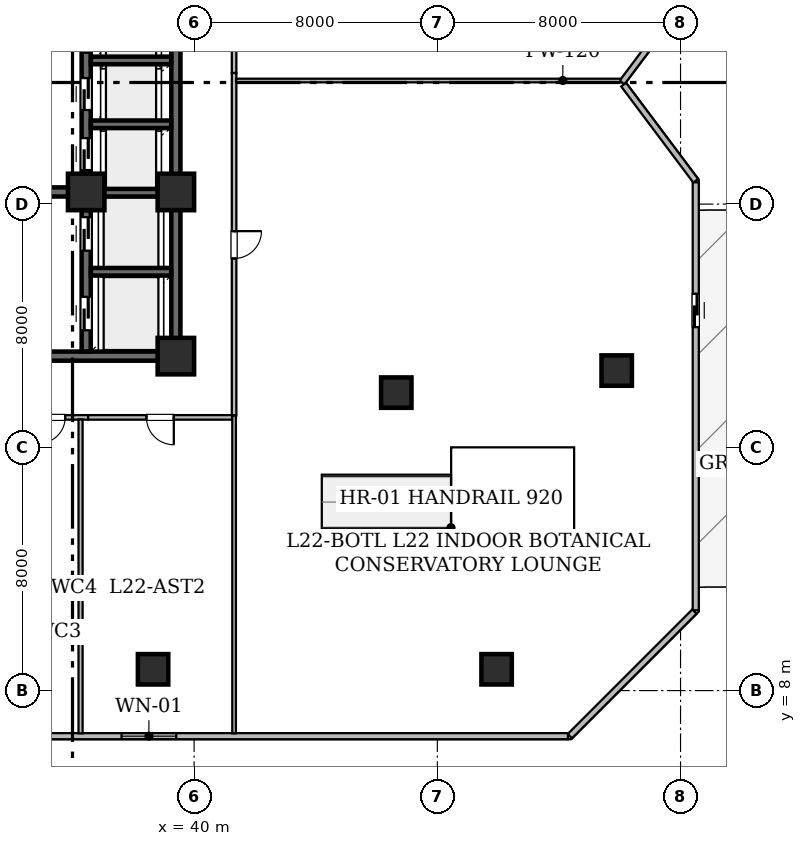
"""IFC4 building model, lengths in metres.
Left out: names, types, materials, properties, quantities, classifications, styles, units other than length and angle.
Written with IfcOpenShell. Run it as: python <this file> out.ifc"""

import sys

from ifc_helpers import new_model, si_unit, direction, frame, frame_2d, origin, origin_2d, place, context, subcontext, project, spatial, rectangle, hollow_rectangle, extrude, element, fill, save


model = new_model("IFC4")
c1 = context("Model", 3, precision=1e-05, world=origin(), true_north=direction((0.0, 1.0)))
c2 = subcontext(c1, "Body", "Model", "MODEL_VIEW")
j1 = project(units=[si_unit("LENGTHUNIT", "METRE"), si_unit("PLANEANGLEUNIT", "RADIAN")], contexts=[c1])
p1 = place(None, origin())
s1 = spatial("IfcSite", under=j1, at=p1, CompositionType="ELEMENT")
p2 = place(p1, origin())
s2 = spatial("IfcBuilding", under=s1, at=p2, CompositionType="ELEMENT")
p3 = place(p2, frame((0.0, 0.0, 89.8)))
s3 = spatial("IfcBuildingStorey", under=s2, at=p3, CompositionType="ELEMENT", Elevation=89.8)
for number, where, z_axis, x_axis in (
    (1, (39.4, 19.0, 0.0), (0.0, 0.0, 1.0), (1.0, 0.0, 0.0)),
    (2, (36.45, 24.4, 0.0), (0.0, 0.0, 1.0), (1.0, 0.0, 0.0)),
    (3, (39.4, 24.4, 0.0), (0.0, 0.0, 1.0), (1.0, 0.0, 0.0)),
):
    element("IfcColumn", number, at=place(p3, frame(where, z_axis=z_axis, x_axis=x_axis)), inside=s3, PredefinedType="COLUMN", context=c2, shape_type="SweptSolid", body=[
        extrude(hollow_rectangle(XDim=1.2, YDim=1.2, WallThickness=0.06, at=origin_2d()), origin(), (0.0, 0.0, 1.0), 4.8),
    ])
for number, where, z_axis, x_axis in (
    (4, (38.65, 8.7, 0.025), (0.0, 0.0, 1.0), (1.0, 0.0, 0.0)),
    (5, (49.95, 8.7, 0.025), (0.0, 0.0, 1.0), (1.0, 0.0, 0.0)),
    (6, (53.9, 18.525, 0.025), (0.0, 0.0, 1.0), (1.0, 0.0, 0.0)),
    (7, (46.65, 17.8, 0.025), (0.0, 0.0, 1.0), (1.0, 0.0, 0.0)),
):
    element("IfcColumn", number, at=place(p3, frame(where, z_axis=z_axis, x_axis=x_axis)), inside=s3, PredefinedType="COLUMN", context=c2, shape_type="SweptSolid", body=[
        extrude(hollow_rectangle(XDim=1.0, YDim=1.0, WallThickness=0.05, at=origin_2d()), origin(), (0.0, 0.0, 1.0), 4.775),
    ])
p4 = place(p3, frame((56.469, 31.191, 0.0), z_axis=(0.0, 0.0, 1.0), x_axis=(-0.600137081448, -0.799897170561, 0.0)))
e8 = element("IfcWall", 8, at=p4, inside=s3, PredefinedType="STANDARD", context=c2, shape_type="SweptSolid", body=[
    extrude(rectangle(XDim=3.989, YDim=0.2, at=frame_2d((1.995, 0.0))), origin(), (0.0, 0.0, 1.0), 4.58),
])
p5 = place(p3, frame((54.127, 27.931, 0.0), z_axis=(0.0, 0.0, 1.0), x_axis=(0.600029630681, -0.799977776132, 0.0)))
e9 = element("IfcWall", 9, at=p5, inside=s3, PredefinedType="STANDARD", context=c2, shape_type="SweptSolid", body=[
    extrude(rectangle(XDim=3.955, YDim=0.2, at=frame_2d((1.978, 0.0))), origin(), (0.0, 0.0, 1.0), 4.58),
])
p6 = place(p3, frame((56.5, 24.717, 0.0), z_axis=(0.0, 0.0, 1.0), x_axis=(0.0, -1.0, 0.0)))
e10 = element("IfcWall", 10, at=p6, inside=s3, PredefinedType="STANDARD", context=c2, shape_type="SweptSolid", body=[
    extrude(rectangle(XDim=14.076, YDim=0.2, at=frame_2d((7.038, 0.0))), origin(), (0.0, 0.0, 1.0), 4.58),
])
p7 = place(p6, frame((3.664, 0.0, 0.0)))
e11 = element("IfcOpeningElement", 11, at=p7, cuts=e10, PredefinedType="OPENING", context=c2, shape_type="SweptSolid", body=[
    extrude(rectangle(XDim=1.1, YDim=2.2, at=frame_2d((0.55, 1.1))), frame((0.0, 0.11, 0.0), z_axis=(0.0, -1.0, 0.0), x_axis=(1.0, 0.0, 0.0)), (0.0, 0.0, 1.0), 0.22),
])
p8 = place(p3, frame((56.457, 10.598, 0.0), z_axis=(0.0, 0.0, 1.0), x_axis=(-0.707127843897, -0.707085717849, 0.0)))
e12 = element("IfcWall", 12, at=p8, inside=s3, PredefinedType="STANDARD", context=c2, shape_type="SweptSolid", body=[
    extrude(rectangle(XDim=5.795, YDim=0.2, at=frame_2d((2.898, 0.0))), origin(), (0.0, 0.0, 1.0), 4.58),
])
p9 = place(p3, frame((52.296, 6.5, 0.0), z_axis=(0.0, 0.0, 1.0), x_axis=(-1.0, 0.0, 0.0)))
e13 = element("IfcWall", 13, at=p9, inside=s3, PredefinedType="STANDARD", context=c2, shape_type="SweptSolid", body=[
    extrude(rectangle(XDim=38.593, YDim=0.2, at=frame_2d((19.296, 0.0))), origin(), (0.0, 0.0, 1.0), 4.58),
])
p10 = place(p9, frame((12.883, 0.0, 0.9)))
e14 = element("IfcOpeningElement", 14, at=p10, cuts=e13, PredefinedType="OPENING", context=c2, shape_type="SweptSolid", body=[
    extrude(rectangle(XDim=1.8, YDim=1.6, at=frame_2d((0.9, 0.8))), frame((0.0, 0.11, 0.0), z_axis=(0.0, -1.0, 0.0), x_axis=(1.0, 0.0, 0.0)), (0.0, 0.0, 1.0), 0.22),
])
p11 = place(p3, frame((29.0, 19.0, 0.0), z_axis=(0.0, 0.0, 1.0), x_axis=(1.0, 0.0, 0.0)))
e15 = element("IfcWall", 15, at=p11, inside=s3, PredefinedType="SHEAR", context=c2, shape_type="SweptSolid", body=[
    extrude(rectangle(XDim=10.4, YDim=0.3, at=frame_2d((5.2, 0.0))), origin(), (0.0, 0.0, 1.0), 4.58),
])
p12 = place(p11, frame((4.9, 0.0, 0.0)))
e16 = element("IfcOpeningElement", 16, at=p12, cuts=e15, PredefinedType="OPENING", context=c2, shape_type="SweptSolid", body=[
    extrude(rectangle(XDim=1.2, YDim=2.15, at=frame_2d((0.6, 1.075))), frame((0.0, 0.16, 0.0), z_axis=(0.0, -1.0, 0.0), x_axis=(1.0, 0.0, 0.0)), (0.0, 0.0, 1.0), 0.32),
])
p13 = place(p3, frame((39.4, 19.0, 0.0), z_axis=(0.0, 0.0, 1.0), x_axis=(0.0, 1.0, 0.0)))
e17 = element("IfcWall", 17, at=p13, inside=s3, PredefinedType="SHEAR", context=c2, shape_type="SweptSolid", body=[
    extrude(rectangle(XDim=5.4, YDim=0.3, at=frame_2d((2.7, 0.0))), origin(), (0.0, 0.0, 1.0), 4.58),
])
p14 = place(p3, frame((39.4, 24.4, 0.0), z_axis=(0.0, 0.0, 1.0), x_axis=(0.0, 1.0, 0.0)))
e18 = element("IfcWall", 18, at=p14, inside=s3, PredefinedType="SHEAR", context=c2, shape_type="SweptSolid", body=[
    extrude(rectangle(XDim=12.6, YDim=0.3, at=frame_2d((6.3, 0.0))), origin(), (0.0, 0.0, 1.0), 4.58),
])
p15 = place(p3, frame((32.65, 24.4, 0.0), z_axis=(0.0, 0.0, 1.0), x_axis=(1.0, 0.0, 0.0)))
e19 = element("IfcWall", 19, at=p15, inside=s3, PredefinedType="SHEAR", context=c2, shape_type="SweptSolid", body=[
    extrude(rectangle(XDim=3.8, YDim=0.3, at=frame_2d((1.9, 0.0))), origin(), (0.0, 0.0, 1.0), 4.58),
])
p16 = place(p15, frame((0.35, 0.0, 0.0)))
e20 = element("IfcOpeningElement", 20, at=p16, cuts=e19, PredefinedType="OPENING", context=c2, shape_type="SweptSolid", body=[
    extrude(rectangle(XDim=1.1, YDim=2.15, at=frame_2d((0.55, 1.075))), frame((0.0, 0.16, 0.0), z_axis=(0.0, -1.0, 0.0), x_axis=(1.0, 0.0, 0.0)), (0.0, 0.0, 1.0), 0.32),
])
p17 = place(p3, frame((36.45, 19.154, 0.0), z_axis=(0.0, 0.0, 1.0), x_axis=(0.0, 1.0, 0.0)))
e21 = element("IfcWall", 21, at=p17, inside=s3, PredefinedType="SHEAR", context=c2, shape_type="SweptSolid", body=[
    extrude(rectangle(XDim=4.646, YDim=0.3, at=frame_2d((2.323, 0.0))), origin(), (0.0, 0.0, 1.0), 4.58),
])
p18 = place(p17, frame((0.696, 0.0, 0.0)))
e22 = element("IfcOpeningElement", 22, at=p18, cuts=e21, PredefinedType="OPENING", context=c2, shape_type="SweptSolid", body=[
    extrude(rectangle(XDim=1.1, YDim=2.15, at=frame_2d((0.55, 1.075))), frame((0.0, 0.16, 0.0), z_axis=(0.0, -1.0, 0.0), x_axis=(1.0, 0.0, 0.0)), (0.0, 0.0, 1.0), 0.32),
])
p19 = place(p17, frame((3.316, 0.0, 0.0)))
e23 = element("IfcOpeningElement", 23, at=p19, cuts=e21, PredefinedType="OPENING", context=c2, shape_type="SweptSolid", body=[
    extrude(rectangle(XDim=1.1, YDim=2.15, at=frame_2d((0.55, 1.075))), frame((0.0, 0.16, 0.0), z_axis=(0.0, -1.0, 0.0), x_axis=(1.0, 0.0, 0.0)), (0.0, 0.0, 1.0), 0.32),
])
p20 = place(p3, frame((36.45, 25.0, 0.0), z_axis=(0.0, 0.0, 1.0), x_axis=(0.0, 1.0, 0.0)))
e24 = element("IfcWall", 24, at=p20, inside=s3, PredefinedType="SHEAR", context=c2, shape_type="SweptSolid", body=[
    extrude(rectangle(XDim=5.15, YDim=0.3, at=frame_2d((2.575, 0.0))), origin(), (0.0, 0.0, 1.0), 4.58),
])
p21 = place(p20, frame((0.12, 0.0, 0.0)))
e25 = element("IfcOpeningElement", 25, at=p21, cuts=e24, PredefinedType="OPENING", context=c2, shape_type="SweptSolid", body=[
    extrude(rectangle(XDim=1.05, YDim=2.15, at=frame_2d((0.525, 1.075))), frame((0.0, 0.16, 0.0), z_axis=(0.0, -1.0, 0.0), x_axis=(1.0, 0.0, 0.0)), (0.0, 0.0, 1.0), 0.32),
])
p22 = place(p20, frame((2.095, 0.0, 0.0)))
e26 = element("IfcOpeningElement", 26, at=p22, cuts=e24, PredefinedType="OPENING", context=c2, shape_type="SweptSolid", body=[
    extrude(rectangle(XDim=1.05, YDim=2.15, at=frame_2d((0.525, 1.075))), frame((0.0, 0.16, 0.0), z_axis=(0.0, -1.0, 0.0), x_axis=(1.0, 0.0, 0.0)), (0.0, 0.0, 1.0), 0.32),
])
p23 = place(p20, frame((3.98, 0.0, 0.0)))
e27 = element("IfcOpeningElement", 27, at=p23, cuts=e24, PredefinedType="OPENING", context=c2, shape_type="SweptSolid", body=[
    extrude(rectangle(XDim=1.05, YDim=2.15, at=frame_2d((0.525, 1.075))), frame((0.0, 0.16, 0.0), z_axis=(0.0, -1.0, 0.0), x_axis=(1.0, 0.0, 0.0)), (0.0, 0.0, 1.0), 0.32),
])
for number, where, z_axis, x_axis in (
    (28, (36.604, 21.775, 0.0), (0.0, 0.0, 1.0), (1.0, 0.0, 0.0)),
    (29, (36.604, 24.375, 0.0), (0.0, 0.0, 1.0), (1.0, 0.0, 0.0)),
    (30, (36.604, 26.625, 0.0), (0.0, 0.0, 1.0), (1.0, 0.0, 0.0)),
    (31, (36.604, 28.725, 0.0), (0.0, 0.0, 1.0), (1.0, 0.0, 0.0)),
):
    element("IfcWall", number, at=place(p3, frame(where, z_axis=z_axis, x_axis=x_axis)), inside=s3, PredefinedType="SHEAR", context=c2, shape_type="SweptSolid", body=[
        extrude(rectangle(XDim=2.642, YDim=0.25, at=frame_2d((1.321, 0.0))), origin(), (0.0, 0.0, 1.0), 4.58),
    ])
p24 = place(p3, frame((41.315, 28.314, 0.0), z_axis=(0.0, 0.0, 1.0), x_axis=(0.0, -1.0, 0.0)))
e32 = element("IfcWall", 32, at=p24, inside=s3, PredefinedType="STANDARD", context=c2, shape_type="SweptSolid", body=[
    extrude(rectangle(XDim=11.264, YDim=0.15, at=frame_2d((5.632, 0.0))), origin(), (0.0, 0.0, 1.0), 3.797),
])
p25 = place(p24, frame((5.203, 0.0, 0.0)))
e33 = element("IfcOpeningElement", 33, at=p25, cuts=e32, PredefinedType="OPENING", context=c2, shape_type="SweptSolid", body=[
    extrude(rectangle(XDim=0.9, YDim=2.1, at=frame_2d((0.45, 1.05))), frame((0.0, 0.085, 0.0), z_axis=(0.0, -1.0, 0.0), x_axis=(1.0, 0.0, 0.0)), (0.0, 0.0, 1.0), 0.17),
])
p26 = place(p3, frame((41.315, 38.95, 0.0), z_axis=(0.0, 0.0, 1.0), x_axis=(0.0, -1.0, 0.0)))
e34 = element("IfcWall", 34, at=p26, inside=s3, PredefinedType="STANDARD", context=c2, shape_type="SweptSolid", body=[
    extrude(rectangle(XDim=10.636, YDim=0.15, at=frame_2d((5.318, 0.0))), origin(), (0.0, 0.0, 1.0), 3.797),
])
p27 = place(p26, frame((4.743, 0.0, 0.0)))
e35 = element("IfcOpeningElement", 35, at=p27, cuts=e34, PredefinedType="OPENING", context=c2, shape_type="SweptSolid", body=[
    extrude(rectangle(XDim=1.15, YDim=2.2, at=frame_2d((0.575, 1.1))), frame((0.0, 0.085, 0.0), z_axis=(0.0, -1.0, 0.0), x_axis=(1.0, 0.0, 0.0)), (0.0, 0.0, 1.0), 0.17),
])
p28 = place(p3, frame((36.514, 16.985, 0.0), z_axis=(0.0, 0.0, 1.0), x_axis=(-1.0, 0.0, 0.0)))
e36 = element("IfcWall", 36, at=p28, inside=s3, PredefinedType="STANDARD", context=c2, shape_type="SweptSolid", body=[
    extrude(rectangle(XDim=2.32, YDim=0.15, at=frame_2d((1.16, 0.0))), origin(), (0.0, 0.0, 1.0), 4.58),
])
p29 = place(p28, frame((0.756, 0.0, 0.0)))
e37 = element("IfcOpeningElement", 37, at=p29, cuts=e36, PredefinedType="OPENING", context=c2, shape_type="SweptSolid", body=[
    extrude(rectangle(XDim=0.85, YDim=2.1, at=frame_2d((0.425, 1.05))), frame((0.0, 0.085, 0.0), z_axis=(0.0, -1.0, 0.0), x_axis=(1.0, 0.0, 0.0)), (0.0, 0.0, 1.0), 0.17),
])
p30 = place(p3, frame((41.25, 16.985, 0.0), z_axis=(0.0, 0.0, 1.0), x_axis=(-1.0, 0.0, 0.0)))
e38 = element("IfcWall", 38, at=p30, inside=s3, PredefinedType="STANDARD", context=c2, shape_type="SweptSolid", body=[
    extrude(rectangle(XDim=4.736, YDim=0.15, at=frame_2d((2.368, 0.0))), origin(), (0.0, 0.0, 1.0), 3.797),
])
p31 = place(p30, frame((1.918, 0.0, 0.0)))
e39 = element("IfcOpeningElement", 39, at=p31, cuts=e38, PredefinedType="OPENING", context=c2, shape_type="SweptSolid", body=[
    extrude(rectangle(XDim=0.9, YDim=2.1, at=frame_2d((0.45, 1.05))), frame((0.0, 0.085, 0.0), z_axis=(0.0, -1.0, 0.0), x_axis=(1.0, 0.0, 0.0)), (0.0, 0.0, 1.0), 0.17),
])
p32 = place(p3, frame((41.38, 28.065, 0.0), z_axis=(0.0, 0.0, 1.0), x_axis=(1.0, 0.0, 0.0)))
e40 = element("IfcWall", 40, at=p32, inside=s3, PredefinedType="PARTITIONING", context=c2, shape_type="SweptSolid", body=[
    extrude(rectangle(XDim=12.645, YDim=0.12, at=frame_2d((6.323, 0.0))), origin(), (0.0, 0.0, 1.0), 3.797),
])
p33 = place(p3, frame((41.315, 6.592, 0.0), z_axis=(0.0, 0.0, 1.0), x_axis=(0.0, 1.0, 0.0)))
e41 = element("IfcWall", 41, at=p33, inside=s3, PredefinedType="PARTITIONING", context=c2, shape_type="SweptSolid", body=[
    extrude(rectangle(XDim=10.458, YDim=0.12, at=frame_2d((5.229, 0.0))), origin(), (0.0, 0.0, 1.0), 4.026),
])
p34 = place(p3, frame((36.265, 16.918, 0.0), z_axis=(0.0, 0.0, 1.0), x_axis=(0.0, -1.0, 0.0)))
e42 = element("IfcWall", 42, at=p34, inside=s3, PredefinedType="PARTITIONING", context=c2, shape_type="SweptSolid", body=[
    extrude(rectangle(XDim=10.326, YDim=0.135, at=frame_2d((5.163, 0.0))), origin(), (0.0, 0.0, 1.0), 4.026),
])
p35 = place(p7, origin())
e43 = element("IfcDoor", 43, at=p35, inside=s3, OperationType="SLIDING_TO_LEFT", PredefinedType="DOOR", context=c2, shape_type="SweptSolid", body=[
    extrude(rectangle(XDim=1.1, YDim=2.2, at=frame_2d((0.55, 1.1))), frame((0.0, 0.025, 0.0), z_axis=(0.0, -1.0, 0.0), x_axis=(1.0, 0.0, 0.0)), (0.0, 0.0, 1.0), 0.05),
])
fill(e11, e43)
p36 = place(p10, origin())
e44 = element("IfcWindow", 44, at=p36, inside=s3, PartitioningType="SINGLE_PANEL", PredefinedType="WINDOW", context=c2, shape_type="SweptSolid", body=[
    extrude(rectangle(XDim=1.8, YDim=1.6, at=frame_2d((0.9, 0.8))), frame((0.0, 0.03, 0.0), z_axis=(0.0, -1.0, 0.0), x_axis=(1.0, 0.0, 0.0)), (0.0, 0.0, 1.0), 0.06),
])
fill(e14, e44)
p37 = place(p18, origin())
e45 = element("IfcDoor", 45, at=p37, inside=s3, OperationType="SLIDING_TO_LEFT", PredefinedType="DOOR", context=c2, shape_type="SweptSolid", body=[
    extrude(rectangle(XDim=1.1, YDim=2.15, at=frame_2d((0.55, 1.075))), frame((0.0, 0.025, 0.0), z_axis=(0.0, -1.0, 0.0), x_axis=(1.0, 0.0, 0.0)), (0.0, 0.0, 1.0), 0.05),
])
fill(e22, e45)
p38 = place(p19, origin())
e46 = element("IfcDoor", 46, at=p38, inside=s3, OperationType="SLIDING_TO_LEFT", PredefinedType="DOOR", context=c2, shape_type="SweptSolid", body=[
    extrude(rectangle(XDim=1.1, YDim=2.15, at=frame_2d((0.55, 1.075))), frame((0.0, 0.025, 0.0), z_axis=(0.0, -1.0, 0.0), x_axis=(1.0, 0.0, 0.0)), (0.0, 0.0, 1.0), 0.05),
])
fill(e23, e46)
p39 = place(p21, origin())
e47 = element("IfcDoor", 47, at=p39, inside=s3, OperationType="SLIDING_TO_LEFT", PredefinedType="DOOR", context=c2, shape_type="SweptSolid", body=[
    extrude(rectangle(XDim=1.05, YDim=2.15, at=frame_2d((0.525, 1.075))), frame((0.0, 0.025, 0.0), z_axis=(0.0, -1.0, 0.0), x_axis=(1.0, 0.0, 0.0)), (0.0, 0.0, 1.0), 0.05),
])
fill(e25, e47)
p40 = place(p22, origin())
e48 = element("IfcDoor", 48, at=p40, inside=s3, OperationType="SLIDING_TO_LEFT", PredefinedType="DOOR", context=c2, shape_type="SweptSolid", body=[
    extrude(rectangle(XDim=1.05, YDim=2.15, at=frame_2d((0.525, 1.075))), frame((0.0, 0.025, 0.0), z_axis=(0.0, -1.0, 0.0), x_axis=(1.0, 0.0, 0.0)), (0.0, 0.0, 1.0), 0.05),
])
fill(e26, e48)
p41 = place(p23, origin())
e49 = element("IfcDoor", 49, at=p41, inside=s3, OperationType="SLIDING_TO_LEFT", PredefinedType="DOOR", context=c2, shape_type="SweptSolid", body=[
    extrude(rectangle(XDim=1.05, YDim=2.15, at=frame_2d((0.525, 1.075))), frame((0.0, 0.025, 0.0), z_axis=(0.0, -1.0, 0.0), x_axis=(1.0, 0.0, 0.0)), (0.0, 0.0, 1.0), 0.05),
])
fill(e27, e49)
p42 = place(p25, origin())
e50 = element("IfcDoor", 50, at=p42, inside=s3, OperationType="SINGLE_SWING_LEFT", PredefinedType="DOOR", context=c2, shape_type="SweptSolid", body=[
    extrude(rectangle(XDim=0.9, YDim=2.1, at=frame_2d((0.45, 1.05))), frame((0.0, 0.025, 0.0), z_axis=(0.0, -1.0, 0.0), x_axis=(1.0, 0.0, 0.0)), (0.0, 0.0, 1.0), 0.05),
])
fill(e33, e50)
p43 = place(p29, origin())
e51 = element("IfcDoor", 51, at=p43, inside=s3, OperationType="SINGLE_SWING_RIGHT", PredefinedType="DOOR", context=c2, shape_type="SweptSolid", body=[
    extrude(rectangle(XDim=0.85, YDim=2.1, at=frame_2d((0.425, 1.05))), frame((0.0, 0.025, 0.0), z_axis=(0.0, -1.0, 0.0), x_axis=(1.0, 0.0, 0.0)), (0.0, 0.0, 1.0), 0.05),
])
fill(e37, e51)
p44 = place(p31, origin())
e52 = element("IfcDoor", 52, at=p44, inside=s3, OperationType="SINGLE_SWING_LEFT", PredefinedType="DOOR", context=c2, shape_type="SweptSolid", body=[
    extrude(rectangle(XDim=0.9, YDim=2.1, at=frame_2d((0.45, 1.05))), frame((0.0, 0.025, 0.0), z_axis=(0.0, -1.0, 0.0), x_axis=(1.0, 0.0, 0.0)), (0.0, 0.0, 1.0), 0.05),
])
fill(e39, e52)
save(model, sys.argv[1])
